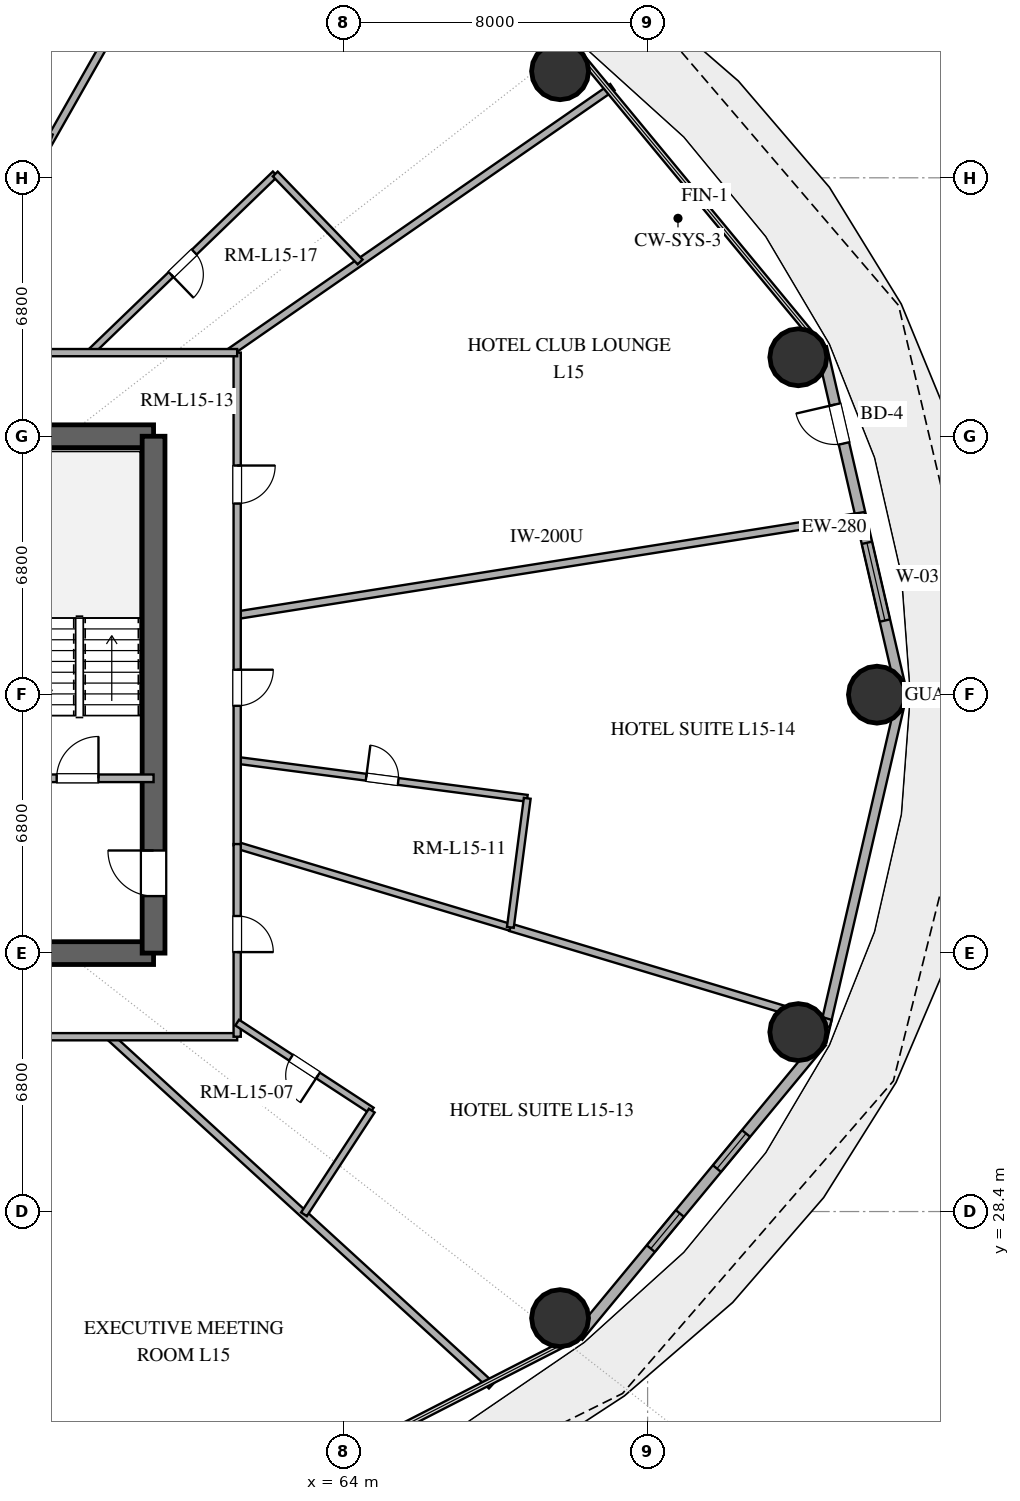
"""IFC4 building model, lengths in metres.
Left out: names, types, materials, properties, quantities, classifications, styles, units other than length and angle.
Written with IfcOpenShell. Run it as: python <this file> out.ifc"""

import sys

from ifc_helpers import new_model, si_unit, direction, frame, frame_2d, origin, origin_2d, place, context, subcontext, project, spatial, rectangle, hollow_circle, extrude, element, fill, save


model = new_model("IFC4")
c1 = context("Model", 3, precision=1e-05, world=origin(), true_north=direction((0.0, 1.0)))
c2 = subcontext(c1, "Body", "Model", "MODEL_VIEW")
j1 = project(units=[si_unit("LENGTHUNIT", "METRE"), si_unit("PLANEANGLEUNIT", "RADIAN")], contexts=[c1])
p1 = place(None, origin())
s1 = spatial("IfcSite", under=j1, at=p1, CompositionType="ELEMENT")
p2 = place(p1, origin())
s2 = spatial("IfcBuilding", under=s1, at=p2, CompositionType="ELEMENT")
p3 = place(p2, frame((0.0, 0.0, 64.2)))
s3 = spatial("IfcBuildingStorey", under=s2, at=p3, CompositionType="ELEMENT", Elevation=64.2)
for number, where, z_axis, x_axis in (
    (1, (55.0, 35.2, 0.0), (0.0, 0.0, 1.0), (1.0, 0.0, 0.0)),
    (2, (55.0, 48.8, 0.0), (0.0, 0.0, 1.0), (1.0, 0.0, 0.0)),
):
    element("IfcWall", number, at=place(p3, frame(where, z_axis=z_axis, x_axis=x_axis)), inside=s3, PredefinedType="SHEAR", context=c2, shape_type="SweptSolid", body=[
        extrude(rectangle(XDim=4.0, YDim=0.6, at=frame_2d((2.0, 0.0))), origin(), (0.0, 0.0, 1.0), 3.38),
    ])
p4 = place(p3, frame((59.0, 35.2, 0.0), z_axis=(0.0, 0.0, 1.0), x_axis=(0.0, 1.0, 0.0)))
e3 = element("IfcWall", 3, at=p4, inside=s3, PredefinedType="SHEAR", context=c2, shape_type="SweptSolid", body=[
    extrude(rectangle(XDim=13.6, YDim=0.6, at=frame_2d((6.8, 0.0))), origin(), (0.0, 0.0, 1.0), 3.38),
])
p5 = place(p4, frame((1.5, 0.0, 0.0)))
e4 = element("IfcOpeningElement", 4, at=p5, cuts=e3, PredefinedType="OPENING", context=c2, shape_type="SweptSolid", body=[
    extrude(rectangle(XDim=1.2, YDim=2.15, at=frame_2d((0.6, 1.075))), frame((0.0, 0.31, 0.0), z_axis=(0.0, -1.0, 0.0), x_axis=(1.0, 0.0, 0.0)), (0.0, 0.0, 1.0), 0.62),
])
for number, where, z_axis, x_axis in (
    (5, (78.035, 42.0, 0.0), (0.0, 0.0, 1.0), (1.0, 0.0, 0.0)),
    (6, (75.966, 50.878, 0.0), (0.0, 0.0, 1.0), (1.0, 0.0, 0.0)),
    (7, (69.697, 58.405, 0.0), (0.0, 0.0, 1.0), (1.0, 0.0, 0.0)),
    (8, (69.697, 25.595, 0.0), (0.0, 0.0, 1.0), (1.0, 0.0, 0.0)),
    (9, (75.966, 33.122, 0.0), (0.0, 0.0, 1.0), (1.0, 0.0, 0.0)),
):
    element("IfcColumn", number, at=place(p3, frame(where, z_axis=z_axis, x_axis=x_axis)), inside=s3, PredefinedType="COLUMN", context=c2, shape_type="SweptSolid", body=[
        extrude(hollow_circle(Radius=0.75, WallThickness=0.04, at=origin_2d()), origin(), (0.0, 0.0, 1.0), 3.38),
    ])
p6 = place(p3, frame((78.696, 42.0, 0.0), z_axis=(0.0, 0.0, 1.0), x_axis=(-0.225454452941, 0.974253709076, 0.0)))
e10 = element("IfcWall", 10, at=p6, inside=s3, PredefinedType="SOLIDWALL", context=c2, shape_type="SweptSolid", body=[
    extrude(rectangle(XDim=9.38, YDim=0.28, at=frame_2d((4.69, 0.0))), origin(), (0.0, 0.0, 1.0), 3.38),
])
p7 = place(p6, frame((2.002, 0.0, 0.85)))
e11 = element("IfcOpeningElement", 11, at=p7, cuts=e10, PredefinedType="OPENING", context=c2, shape_type="SweptSolid", body=[
    extrude(rectangle(XDim=2.1, YDim=2.2, at=frame_2d((1.05, 1.1))), frame((0.0, 0.15, 0.0), z_axis=(0.0, -1.0, 0.0), x_axis=(1.0, 0.0, 0.0)), (0.0, 0.0, 1.0), 0.3),
])
p8 = place(p6, frame((6.785, 0.0, 0.0)))
e12 = element("IfcOpeningElement", 12, at=p8, cuts=e10, PredefinedType="OPENING", context=c2, shape_type="SweptSolid", body=[
    extrude(rectangle(XDim=1.05, YDim=2.2, at=frame_2d((0.525, 1.1))), frame((0.0, 0.15, 0.0), z_axis=(0.0, -1.0, 0.0), x_axis=(1.0, 0.0, 0.0)), (0.0, 0.0, 1.0), 0.3),
])
p9 = place(p3, frame((70.174, 58.886, 0.0), z_axis=(0.0, 0.0, 1.0), x_axis=(-0.889853976658, 0.456245438581, 0.0)))
e13 = element("IfcWall", 13, at=p9, inside=s3, PredefinedType="SOLIDWALL", context=c2, shape_type="SweptSolid", body=[
    extrude(rectangle(XDim=11.346, YDim=0.28, at=frame_2d((5.673, 0.0))), origin(), (0.0, 0.0, 1.0), 3.38),
])
p10 = place(p9, frame((3.267, 0.0, 0.85)))
e14 = element("IfcOpeningElement", 14, at=p10, cuts=e13, PredefinedType="OPENING", context=c2, shape_type="SweptSolid", body=[
    extrude(rectangle(XDim=1.65, YDim=2.0, at=frame_2d((0.825, 1.0))), frame((0.0, 0.15, 0.0), z_axis=(0.0, -1.0, 0.0), x_axis=(1.0, 0.0, 0.0)), (0.0, 0.0, 1.0), 0.3),
])
p11 = place(p9, frame((6.579, 0.0, 0.85)))
e15 = element("IfcOpeningElement", 15, at=p11, cuts=e13, PredefinedType="OPENING", context=c2, shape_type="SweptSolid", body=[
    extrude(rectangle(XDim=1.65, YDim=2.0, at=frame_2d((0.825, 1.0))), frame((0.0, 0.15, 0.0), z_axis=(0.0, -1.0, 0.0), x_axis=(1.0, 0.0, 0.0)), (0.0, 0.0, 1.0), 0.3),
])
p12 = place(p3, frame((70.174, 25.114, 0.0), z_axis=(0.0, 0.0, 1.0), x_axis=(0.637296809613, 0.770618437657, 0.0)))
e16 = element("IfcWall", 16, at=p12, inside=s3, PredefinedType="SOLIDWALL", context=c2, shape_type="SweptSolid", body=[
    extrude(rectangle(XDim=10.053, YDim=0.28, at=frame_2d((5.027, 0.0))), origin(), (0.0, 0.0, 1.0), 3.38),
])
p13 = place(p12, frame((2.998, 0.0, 0.85)))
e17 = element("IfcOpeningElement", 17, at=p13, cuts=e16, PredefinedType="OPENING", context=c2, shape_type="SweptSolid", body=[
    extrude(rectangle(XDim=1.2, YDim=1.8, at=frame_2d((0.6, 0.9))), frame((0.0, 0.15, 0.0), z_axis=(0.0, -1.0, 0.0), x_axis=(1.0, 0.0, 0.0)), (0.0, 0.0, 1.0), 0.3),
])
p14 = place(p12, frame((5.73, 0.0, 0.85)))
e18 = element("IfcOpeningElement", 18, at=p14, cuts=e16, PredefinedType="OPENING", context=c2, shape_type="SweptSolid", body=[
    extrude(rectangle(XDim=1.2, YDim=1.8, at=frame_2d((0.6, 0.9))), frame((0.0, 0.15, 0.0), z_axis=(0.0, -1.0, 0.0), x_axis=(1.0, 0.0, 0.0)), (0.0, 0.0, 1.0), 0.3),
])
p15 = place(p3, frame((76.581, 32.862, 0.0), z_axis=(0.0, 0.0, 1.0), x_axis=(0.225454452941, 0.974253709076, 0.0)))
e19 = element("IfcWall", 19, at=p15, inside=s3, PredefinedType="SOLIDWALL", context=c2, shape_type="SweptSolid", body=[
    extrude(rectangle(XDim=9.38, YDim=0.25, at=frame_2d((4.69, 0.0))), origin(), (0.0, 0.0, 1.0), 3.38),
])
p16 = place(p3, frame((55.0, 39.8, 0.0), z_axis=(0.0, 0.0, 1.0), x_axis=(1.0, 0.0, 0.0)))
e20 = element("IfcWall", 20, at=p16, inside=s3, PredefinedType="SOLIDWALL", context=c2, shape_type="SweptSolid", body=[
    extrude(rectangle(XDim=4.0, YDim=0.2, at=frame_2d((2.0, 0.0))), origin(), (0.0, 0.0, 1.0), 2.74),
])
p17 = place(p16, frame((1.45, 0.0, 0.0)))
e21 = element("IfcOpeningElement", 21, at=p17, cuts=e20, PredefinedType="OPENING", context=c2, shape_type="SweptSolid", body=[
    extrude(rectangle(XDim=1.1, YDim=2.15, at=frame_2d((0.55, 1.075))), frame((0.0, 0.11, 0.0), z_axis=(0.0, -1.0, 0.0), x_axis=(1.0, 0.0, 0.0)), (0.0, 0.0, 1.0), 0.22),
])
p18 = place(p3, frame((61.2, 44.091, 0.0), z_axis=(0.0, 0.0, 1.0), x_axis=(0.987690823911, 0.156418785194, 0.0)))
e22 = element("IfcWall", 22, at=p18, inside=s3, PredefinedType="PARTITIONING", context=c2, shape_type="SweptSolid", body=[
    extrude(rectangle(XDim=16.735, YDim=0.2, at=frame_2d((8.368, 0.0))), origin(), (0.0, 0.0, 1.0), 2.74),
])
p19 = place(p3, frame((51.61, 33.0, 0.0), z_axis=(0.0, 0.0, 1.0), x_axis=(0.372301847193, -0.928111703717, 0.0)))
e23 = element("IfcWall", 23, at=p19, inside=s3, PredefinedType="PARTITIONING", context=c2, shape_type="SweptSolid", body=[
    extrude(rectangle(XDim=14.688, YDim=0.2, at=frame_2d((7.344, 0.0))), origin(), (0.0, 0.0, 1.0), 2.74),
])
p20 = place(p3, frame((76.816, 33.347, 0.0), z_axis=(0.0, 0.0, 1.0), x_axis=(-0.957749889613, 0.287602414708, 0.0)))
e24 = element("IfcWall", 24, at=p20, inside=s3, PredefinedType="PARTITIONING", context=c2, shape_type="SweptSolid", body=[
    extrude(rectangle(XDim=8.8, YDim=0.2, at=frame_2d((4.4, 0.0))), origin(), (0.0, 0.0, 1.0), 2.74),
])
p21 = place(p3, frame((53.107, 51.0, 0.0), z_axis=(0.0, 0.0, 1.0), x_axis=(0.493512300658, 0.869738816599, 0.0)))
e25 = element("IfcWall", 25, at=p21, inside=s3, PredefinedType="PARTITIONING", context=c2, shape_type="SweptSolid", body=[
    extrude(rectangle(XDim=14.938, YDim=0.2, at=frame_2d((7.469, 0.0))), origin(), (0.0, 0.0, 1.0), 2.74),
])
p22 = place(p3, frame((60.991, 51.0, 0.0), z_axis=(0.0, 0.0, 1.0), x_axis=(0.821999402566, 0.569488351226, 0.0)))
e26 = element("IfcWall", 26, at=p22, inside=s3, PredefinedType="PARTITIONING", context=c2, shape_type="SweptSolid", body=[
    extrude(rectangle(XDim=12.266, YDim=0.2, at=frame_2d((6.133, 0.0))), origin(), (0.0, 0.0, 1.0), 2.74),
])
p23 = place(p3, frame((61.2, 40.272, 0.0), z_axis=(0.0, 0.0, 1.0), x_axis=(0.991543548491, -0.129774386708, 0.0)))
e27 = element("IfcWall", 27, at=p23, inside=s3, PredefinedType="PLUMBINGWALL", context=c2, shape_type="SweptSolid", body=[
    extrude(rectangle(XDim=7.698, YDim=0.18, at=frame_2d((3.849, 0.0))), origin(), (0.0, 0.0, 1.0), 2.74),
])
p24 = place(p23, frame((3.424, 0.0, 0.0)))
e28 = element("IfcOpeningElement", 28, at=p24, cuts=e27, PredefinedType="OPENING", context=c2, shape_type="SweptSolid", body=[
    extrude(rectangle(XDim=0.85, YDim=2.1, at=frame_2d((0.425, 1.05))), frame((0.0, 0.1, 0.0), z_axis=(0.0, -1.0, 0.0), x_axis=(1.0, 0.0, 0.0)), (0.0, 0.0, 1.0), 0.2),
])
p25 = place(p3, frame((68.388, 35.878, 0.0), z_axis=(0.0, 0.0, 1.0), x_axis=(-0.95775642604, 0.28758064674, 0.0)))
e29 = element("IfcWall", 29, at=p25, inside=s3, PredefinedType="PLUMBINGWALL", context=c2, shape_type="SweptSolid", body=[
    extrude(rectangle(XDim=7.506, YDim=0.18, at=frame_2d((3.753, 0.0))), origin(), (0.0, 0.0, 1.0), 2.74),
])
p26 = place(p3, frame((57.846, 33.0, 0.0), z_axis=(0.0, 0.0, 1.0), x_axis=(0.738119160364, -0.674670367738, 0.0)))
e30 = element("IfcWall", 30, at=p26, inside=s3, PredefinedType="PARTITIONING", context=c2, shape_type="SweptSolid", body=[
    extrude(rectangle(XDim=13.61, YDim=0.2, at=frame_2d((6.805, 0.0))), origin(), (0.0, 0.0, 1.0), 2.74),
])
p27 = place(p3, frame((61.2, 51.0, 0.0), z_axis=(0.0, 0.0, 1.0), x_axis=(0.0, -1.0, 0.0)))
e31 = element("IfcWall", 31, at=p27, inside=s3, PredefinedType="PARTITIONING", context=c2, shape_type="SweptSolid", body=[
    extrude(rectangle(XDim=12.964, YDim=0.19, at=frame_2d((6.482, 0.0))), origin(), (0.0, 0.0, 1.0), 2.74),
])
p28 = place(p27, frame((2.971, 0.0, 0.0)))
e32 = element("IfcOpeningElement", 32, at=p28, cuts=e31, PredefinedType="OPENING", context=c2, shape_type="SweptSolid", body=[
    extrude(rectangle(XDim=1.0, YDim=2.2, at=frame_2d((0.5, 1.1))), frame((0.0, 0.105, 0.0), z_axis=(0.0, -1.0, 0.0), x_axis=(1.0, 0.0, 0.0)), (0.0, 0.0, 1.0), 0.21),
])
p29 = place(p27, frame((8.344, 0.0, 0.0)))
e33 = element("IfcOpeningElement", 33, at=p29, cuts=e31, PredefinedType="OPENING", context=c2, shape_type="SweptSolid", body=[
    extrude(rectangle(XDim=0.95, YDim=2.15, at=frame_2d((0.475, 1.075))), frame((0.0, 0.105, 0.0), z_axis=(0.0, -1.0, 0.0), x_axis=(1.0, 0.0, 0.0)), (0.0, 0.0, 1.0), 0.21),
])
p30 = place(p3, frame((62.202, 55.701, 0.0), z_axis=(0.0, 0.0, 1.0), x_axis=(-0.719667322044, -0.69431905172, 0.0)))
e34 = element("IfcWall", 34, at=p30, inside=s3, PredefinedType="PLUMBINGWALL", context=c2, shape_type="SweptSolid", body=[
    extrude(rectangle(XDim=6.771, YDim=0.18, at=frame_2d((3.385, 0.0))), origin(), (0.0, 0.0, 1.0), 2.74),
])
p31 = place(p30, frame((2.96, 0.0, 0.0)))
e35 = element("IfcOpeningElement", 35, at=p31, cuts=e34, PredefinedType="OPENING", context=c2, shape_type="SweptSolid", body=[
    extrude(rectangle(XDim=0.85, YDim=2.1, at=frame_2d((0.425, 1.05))), frame((0.0, 0.1, 0.0), z_axis=(0.0, -1.0, 0.0), x_axis=(1.0, 0.0, 0.0)), (0.0, 0.0, 1.0), 0.2),
])
p32 = place(p3, frame((61.2, 33.0, 0.0), z_axis=(0.0, 0.0, 1.0), x_axis=(-1.0, 0.0, 0.0)))
e36 = element("IfcWall", 36, at=p32, inside=s3, PredefinedType="PARTITIONING", context=c2, shape_type="SweptSolid", body=[
    extrude(rectangle(XDim=13.839, YDim=0.19, at=frame_2d((6.919, 0.0))), origin(), (0.0, 0.0, 1.0), 2.74),
])
p33 = place(p32, frame((5.965, 0.0, 0.0)))
e37 = element("IfcOpeningElement", 37, at=p33, cuts=e36, PredefinedType="OPENING", context=c2, shape_type="SweptSolid", body=[
    extrude(rectangle(XDim=1.0, YDim=2.2, at=frame_2d((0.5, 1.1))), frame((0.0, 0.105, 0.0), z_axis=(0.0, -1.0, 0.0), x_axis=(1.0, 0.0, 0.0)), (0.0, 0.0, 1.0), 0.21),
])
p34 = place(p32, frame((10.493, 0.0, 0.0)))
e38 = element("IfcOpeningElement", 38, at=p34, cuts=e36, PredefinedType="OPENING", context=c2, shape_type="SweptSolid", body=[
    extrude(rectangle(XDim=0.95, YDim=2.15, at=frame_2d((0.475, 1.075))), frame((0.0, 0.105, 0.0), z_axis=(0.0, -1.0, 0.0), x_axis=(1.0, 0.0, 0.0)), (0.0, 0.0, 1.0), 0.21),
])
p35 = place(p3, frame((61.2, 38.07, 0.0), z_axis=(0.0, 0.0, 1.0), x_axis=(0.0, -1.0, 0.0)))
e39 = element("IfcWall", 39, at=p35, inside=s3, PredefinedType="PARTITIONING", context=c2, shape_type="SweptSolid", body=[
    extrude(rectangle(XDim=5.07, YDim=0.19, at=frame_2d((2.535, 0.0))), origin(), (0.0, 0.0, 1.0), 2.74),
])
p36 = place(p35, frame((1.893, 0.0, 0.0)))
e40 = element("IfcOpeningElement", 40, at=p36, cuts=e39, PredefinedType="OPENING", context=c2, shape_type="SweptSolid", body=[
    extrude(rectangle(XDim=0.95, YDim=2.15, at=frame_2d((0.475, 1.075))), frame((0.0, 0.105, 0.0), z_axis=(0.0, -1.0, 0.0), x_axis=(1.0, 0.0, 0.0)), (0.0, 0.0, 1.0), 0.21),
])
p37 = place(p3, frame((51.298, 51.0, 0.0), z_axis=(0.0, 0.0, 1.0), x_axis=(1.0, 0.0, 0.0)))
e41 = element("IfcWall", 41, at=p37, inside=s3, PredefinedType="PARTITIONING", context=c2, shape_type="SweptSolid", body=[
    extrude(rectangle(XDim=9.902, YDim=0.19, at=frame_2d((4.951, 0.0))), origin(), (0.0, 0.0, 1.0), 2.74),
])
p38 = place(p37, frame((3.45, 0.0, 0.0)))
e42 = element("IfcOpeningElement", 42, at=p38, cuts=e41, PredefinedType="OPENING", context=c2, shape_type="SweptSolid", body=[
    extrude(rectangle(XDim=0.95, YDim=2.15, at=frame_2d((0.475, 1.075))), frame((0.0, 0.105, 0.0), z_axis=(0.0, -1.0, 0.0), x_axis=(1.0, 0.0, 0.0)), (0.0, 0.0, 1.0), 0.21),
])
p39 = place(p3, frame((64.742, 31.056, 0.0), z_axis=(0.0, 0.0, 1.0), x_axis=(-0.837031612028, 0.5471545307, 0.0)))
e43 = element("IfcWall", 43, at=p39, inside=s3, PredefinedType="PLUMBINGWALL", context=c2, shape_type="SweptSolid", body=[
    extrude(rectangle(XDim=4.231, YDim=0.18, at=frame_2d((2.116, 0.0))), origin(), (0.0, 0.0, 1.0), 2.74),
])
p40 = place(p39, frame((1.691, 0.0, 0.0)))
e44 = element("IfcOpeningElement", 44, at=p40, cuts=e43, PredefinedType="OPENING", context=c2, shape_type="SweptSolid", body=[
    extrude(rectangle(XDim=0.85, YDim=2.1, at=frame_2d((0.425, 1.05))), frame((0.0, 0.1, 0.0), z_axis=(0.0, -1.0, 0.0), x_axis=(1.0, 0.0, 0.0)), (0.0, 0.0, 1.0), 0.2),
])
p41 = place(p3, frame((68.833, 39.273, 0.0), z_axis=(0.0, 0.0, 1.0), x_axis=(-0.129823772588, -0.991537083558, 0.0)))
e45 = element("IfcWall", 45, at=p41, inside=s3, PredefinedType="PLUMBINGWALL", context=c2, shape_type="SweptSolid", body=[
    extrude(rectangle(XDim=3.425, YDim=0.18, at=frame_2d((1.712, 0.0))), origin(), (0.0, 0.0, 1.0), 2.74),
])
p42 = place(p3, frame((62.958, 28.328, 0.0), z_axis=(0.0, 0.0, 1.0), x_axis=(0.547176717469, 0.837017108463, 0.0)))
e46 = element("IfcWall", 46, at=p42, inside=s3, PredefinedType="PLUMBINGWALL", context=c2, shape_type="SweptSolid", body=[
    extrude(rectangle(XDim=3.26, YDim=0.18, at=frame_2d((1.63, 0.0))), origin(), (0.0, 0.0, 1.0), 2.74),
])
p43 = place(p3, frame((64.435, 53.386, 0.0), z_axis=(0.0, 0.0, 1.0), x_axis=(-0.694278833189, 0.719706121821, 0.0)))
e47 = element("IfcWall", 47, at=p43, inside=s3, PredefinedType="PLUMBINGWALL", context=c2, shape_type="SweptSolid", body=[
    extrude(rectangle(XDim=3.217, YDim=0.18, at=frame_2d((1.608, 0.0))), origin(), (0.0, 0.0, 1.0), 2.74),
])
p44 = place(p3, frame((56.315, 56.653, 0.0), z_axis=(0.0, 0.0, 1.0), x_axis=(-0.937805250992, 0.347161793999, 0.0)))
e48 = element("IfcWall", 48, at=p44, inside=s3, PredefinedType="PLUMBINGWALL", context=c2, shape_type="SweptSolid", body=[
    extrude(rectangle(XDim=2.71, YDim=0.18, at=frame_2d((1.355, 0.0))), origin(), (0.0, 0.0, 1.0), 2.74),
])
p45 = place(p7, origin())
e49 = element("IfcWindow", 49, at=p45, inside=s3, PartitioningType="SINGLE_PANEL", PredefinedType="WINDOW", context=c2, shape_type="SweptSolid", body=[
    extrude(rectangle(XDim=2.1, YDim=2.2, at=frame_2d((1.05, 1.1))), frame((0.0, 0.03, 0.0), z_axis=(0.0, -1.0, 0.0), x_axis=(1.0, 0.0, 0.0)), (0.0, 0.0, 1.0), 0.06),
])
fill(e11, e49)
p46 = place(p8, origin())
e50 = element("IfcDoor", 50, at=p46, inside=s3, OperationType="SINGLE_SWING_RIGHT", PredefinedType="DOOR", context=c2, shape_type="SweptSolid", body=[
    extrude(rectangle(XDim=1.05, YDim=2.2, at=frame_2d((0.525, 1.1))), frame((0.0, 0.025, 0.0), z_axis=(0.0, -1.0, 0.0), x_axis=(1.0, 0.0, 0.0)), (0.0, 0.0, 1.0), 0.05),
])
fill(e12, e50)
p47 = place(p13, origin())
e51 = element("IfcWindow", 51, at=p47, inside=s3, PartitioningType="SINGLE_PANEL", PredefinedType="WINDOW", context=c2, shape_type="SweptSolid", body=[
    extrude(rectangle(XDim=1.2, YDim=1.8, at=frame_2d((0.6, 0.9))), frame((0.0, 0.03, 0.0), z_axis=(0.0, -1.0, 0.0), x_axis=(1.0, 0.0, 0.0)), (0.0, 0.0, 1.0), 0.06),
])
fill(e17, e51)
p48 = place(p14, origin())
e52 = element("IfcWindow", 52, at=p48, inside=s3, PartitioningType="SINGLE_PANEL", PredefinedType="WINDOW", context=c2, shape_type="SweptSolid", body=[
    extrude(rectangle(XDim=1.2, YDim=1.8, at=frame_2d((0.6, 0.9))), frame((0.0, 0.03, 0.0), z_axis=(0.0, -1.0, 0.0), x_axis=(1.0, 0.0, 0.0)), (0.0, 0.0, 1.0), 0.06),
])
fill(e18, e52)
p49 = place(p5, origin())
e53 = element("IfcDoor", 53, at=p49, inside=s3, OperationType="SINGLE_SWING_RIGHT", PredefinedType="DOOR", context=c2, shape_type="SweptSolid", body=[
    extrude(rectangle(XDim=1.2, YDim=2.15, at=frame_2d((0.6, 1.075))), frame((0.0, 0.025, 0.0), z_axis=(0.0, -1.0, 0.0), x_axis=(1.0, 0.0, 0.0)), (0.0, 0.0, 1.0), 0.05),
])
fill(e4, e53)
p50 = place(p17, origin())
e54 = element("IfcDoor", 54, at=p50, inside=s3, OperationType="SINGLE_SWING_RIGHT", PredefinedType="DOOR", context=c2, shape_type="SweptSolid", body=[
    extrude(rectangle(XDim=1.1, YDim=2.15, at=frame_2d((0.55, 1.075))), frame((0.0, 0.025, 0.0), z_axis=(0.0, -1.0, 0.0), x_axis=(1.0, 0.0, 0.0)), (0.0, 0.0, 1.0), 0.05),
])
fill(e21, e54)
p51 = place(p24, origin())
e55 = element("IfcDoor", 55, at=p51, inside=s3, OperationType="SINGLE_SWING_LEFT", PredefinedType="DOOR", context=c2, shape_type="SweptSolid", body=[
    extrude(rectangle(XDim=0.85, YDim=2.1, at=frame_2d((0.425, 1.05))), frame((0.0, 0.025, 0.0), z_axis=(0.0, -1.0, 0.0), x_axis=(1.0, 0.0, 0.0)), (0.0, 0.0, 1.0), 0.05),
])
fill(e28, e55)
p52 = place(p28, origin())
e56 = element("IfcDoor", 56, at=p52, inside=s3, OperationType="SINGLE_SWING_LEFT", PredefinedType="DOOR", context=c2, shape_type="SweptSolid", body=[
    extrude(rectangle(XDim=1.0, YDim=2.2, at=frame_2d((0.5, 1.1))), frame((0.0, 0.025, 0.0), z_axis=(0.0, -1.0, 0.0), x_axis=(1.0, 0.0, 0.0)), (0.0, 0.0, 1.0), 0.05),
])
fill(e32, e56)
p53 = place(p29, origin())
e57 = element("IfcDoor", 57, at=p53, inside=s3, OperationType="SINGLE_SWING_LEFT", PredefinedType="DOOR", context=c2, shape_type="SweptSolid", body=[
    extrude(rectangle(XDim=0.95, YDim=2.15, at=frame_2d((0.475, 1.075))), frame((0.0, 0.025, 0.0), z_axis=(0.0, -1.0, 0.0), x_axis=(1.0, 0.0, 0.0)), (0.0, 0.0, 1.0), 0.05),
])
fill(e33, e57)
p54 = place(p31, origin())
e58 = element("IfcDoor", 58, at=p54, inside=s3, OperationType="SINGLE_SWING_RIGHT", PredefinedType="DOOR", context=c2, shape_type="SweptSolid", body=[
    extrude(rectangle(XDim=0.85, YDim=2.1, at=frame_2d((0.425, 1.05))), frame((0.0, 0.025, 0.0), z_axis=(0.0, -1.0, 0.0), x_axis=(1.0, 0.0, 0.0)), (0.0, 0.0, 1.0), 0.05),
])
fill(e35, e58)
p55 = place(p36, origin())
e59 = element("IfcDoor", 59, at=p55, inside=s3, OperationType="SINGLE_SWING_RIGHT", PredefinedType="DOOR", context=c2, shape_type="SweptSolid", body=[
    extrude(rectangle(XDim=0.95, YDim=2.15, at=frame_2d((0.475, 1.075))), frame((0.0, 0.025, 0.0), z_axis=(0.0, -1.0, 0.0), x_axis=(1.0, 0.0, 0.0)), (0.0, 0.0, 1.0), 0.05),
])
fill(e40, e59)
p56 = place(p40, origin())
e60 = element("IfcDoor", 60, at=p56, inside=s3, OperationType="SINGLE_SWING_LEFT", PredefinedType="DOOR", context=c2, shape_type="SweptSolid", body=[
    extrude(rectangle(XDim=0.85, YDim=2.1, at=frame_2d((0.425, 1.05))), frame((0.0, 0.025, 0.0), z_axis=(0.0, -1.0, 0.0), x_axis=(1.0, 0.0, 0.0)), (0.0, 0.0, 1.0), 0.05),
])
fill(e44, e60)
save(model, sys.argv[1])
